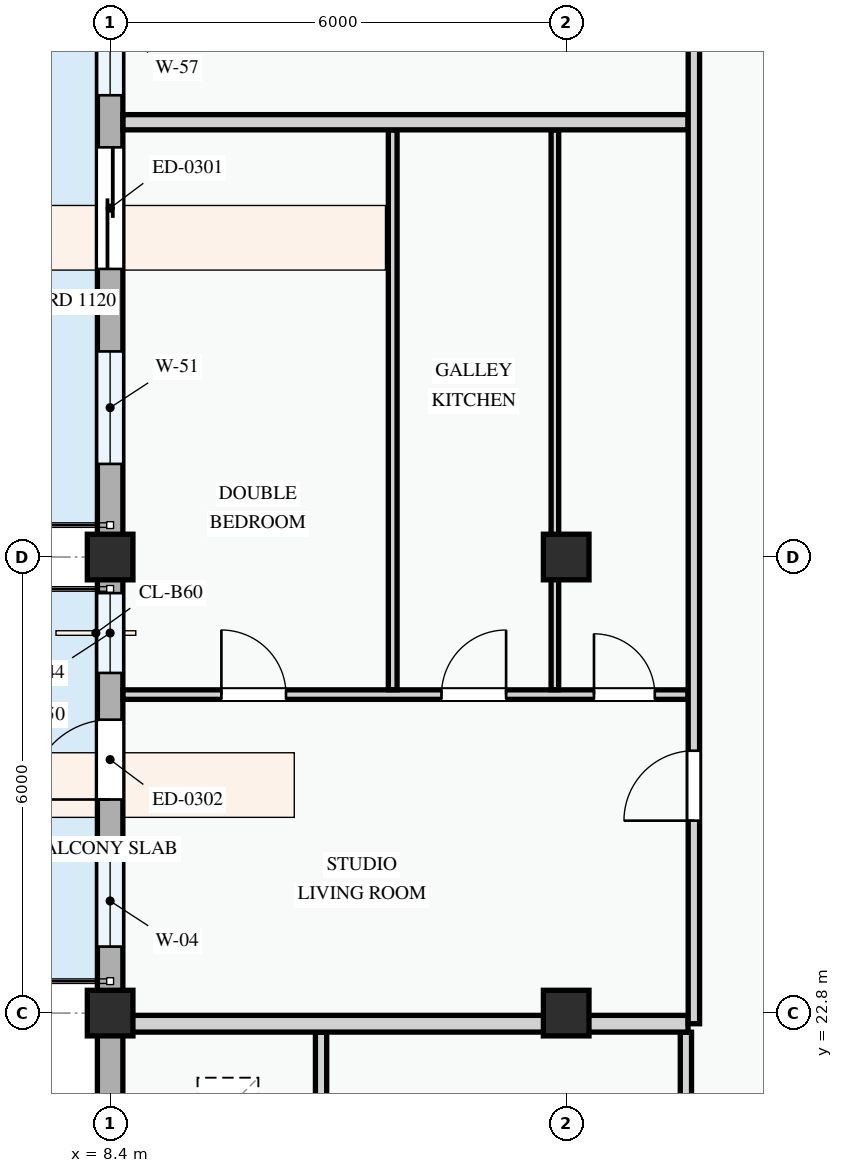
"""IFC4 building model, lengths in metres.
Left out: names, types, materials, properties, quantities, classifications, styles, units other than length and angle.
Written with IfcOpenShell. Run it as: python <this file> out.ifc"""

import sys

from ifc_helpers import new_model, si_unit, direction, frame, frame_2d, origin, origin_2d, place, context, subcontext, project, spatial, rectangle, extrude, element, fill, save


model = new_model("IFC4")
c1 = context("Model", 3, precision=1e-05, world=origin(), true_north=direction((0.0, 1.0)))
c2 = subcontext(c1, "Body", "Model", "MODEL_VIEW")
j1 = project(units=[si_unit("LENGTHUNIT", "METRE"), si_unit("PLANEANGLEUNIT", "RADIAN")], contexts=[c1])
p1 = place(None, origin())
s1 = spatial("IfcSite", under=j1, at=p1, CompositionType="ELEMENT")
p2 = place(p1, origin())
s2 = spatial("IfcBuilding", under=s1, at=p2, CompositionType="ELEMENT")
p3 = place(p2, frame((0.0, 0.0, 11.4)))
s3 = spatial("IfcBuildingStorey", under=s2, at=p3, CompositionType="ELEMENT", Elevation=11.4)
for number, where, z_axis, x_axis in (
    (1, (8.4, 22.8, 0.0), (0.0, 0.0, 1.0), (1.0, 0.0, 0.0)),
    (2, (8.4, 28.8, 0.0), (0.0, 0.0, 1.0), (1.0, 0.0, 0.0)),
    (3, (14.4, 22.8, 0.0), (0.0, 0.0, 1.0), (1.0, 0.0, 0.0)),
    (4, (14.4, 28.8, 0.0), (0.0, 0.0, 1.0), (1.0, 0.0, 0.0)),
):
    element("IfcColumn", number, at=place(p3, frame(where, z_axis=z_axis, x_axis=x_axis)), inside=s3, PredefinedType="COLUMN", context=c2, shape_type="SweptSolid", body=[
        extrude(rectangle(XDim=0.6, YDim=0.6, at=origin_2d()), origin(), (0.0, 0.0, 1.0), 3.3),
    ])
p4 = place(p3, frame((8.4, 37.2, 0.0), z_axis=(0.0, 0.0, 1.0), x_axis=(0.0, -1.0, 0.0)))
e5 = element("IfcWall", 5, at=p4, inside=s3, PredefinedType="STANDARD", context=c2, shape_type="SweptSolid", body=[
    extrude(rectangle(XDim=8.4, YDim=0.335, at=frame_2d((4.2, 0.0))), origin(), (0.0, 0.0, 1.0), 2.425),
])
p5 = place(p4, frame((3.01, 0.0, 0.0)))
e6 = element("IfcOpeningElement", 6, at=p5, cuts=e5, PredefinedType="OPENING", context=c2, shape_type="SweptSolid", body=[
    extrude(rectangle(XDim=1.6, YDim=2.2, at=frame_2d((0.8, 1.1))), frame((0.0, 0.177, 0.0), z_axis=(0.0, -1.0, 0.0), x_axis=(1.0, 0.0, 0.0)), (0.0, 0.0, 1.0), 0.355),
])
p6 = place(p4, frame((0.545, 0.0, 0.78)))
e7 = element("IfcOpeningElement", 7, at=p6, cuts=e5, PredefinedType="OPENING", context=c2, shape_type="SweptSolid", body=[
    extrude(rectangle(XDim=1.78, YDim=1.42, at=frame_2d((0.89, 0.71))), frame((0.0, 0.177, 0.0), z_axis=(0.0, -1.0, 0.0), x_axis=(1.0, 0.0, 0.0)), (0.0, 0.0, 1.0), 0.355),
])
p7 = place(p4, frame((5.695, 0.0, 0.78)))
e8 = element("IfcOpeningElement", 8, at=p7, cuts=e5, PredefinedType="OPENING", context=c2, shape_type="SweptSolid", body=[
    extrude(rectangle(XDim=1.48, YDim=1.52, at=frame_2d((0.74, 0.76))), frame((0.0, 0.177, 0.0), z_axis=(0.0, -1.0, 0.0), x_axis=(1.0, 0.0, 0.0)), (0.0, 0.0, 1.0), 0.355),
])
p8 = place(p3, frame((8.4, 28.8, 0.0), z_axis=(0.0, 0.0, 1.0), x_axis=(0.0, -1.0, 0.0)))
e9 = element("IfcWall", 9, at=p8, inside=s3, PredefinedType="STANDARD", context=c2, shape_type="SweptSolid", body=[
    extrude(rectangle(XDim=6.0, YDim=0.335, at=frame_2d((3.0, 0.0))), origin(), (0.0, 0.0, 1.0), 2.575),
])
p9 = place(p8, frame((2.14, 0.0, 0.0)))
e10 = element("IfcOpeningElement", 10, at=p9, cuts=e9, PredefinedType="OPENING", context=c2, shape_type="SweptSolid", body=[
    extrude(rectangle(XDim=1.05, YDim=2.15, at=frame_2d((0.525, 1.075))), frame((0.0, 0.177, 0.0), z_axis=(0.0, -1.0, 0.0), x_axis=(1.0, 0.0, 0.0)), (0.0, 0.0, 1.0), 0.355),
])
p10 = place(p8, frame((0.475, 0.0, 0.78)))
e11 = element("IfcOpeningElement", 11, at=p10, cuts=e9, PredefinedType="OPENING", context=c2, shape_type="SweptSolid", body=[
    extrude(rectangle(XDim=1.05, YDim=1.2, at=frame_2d((0.525, 0.6))), frame((0.0, 0.177, 0.0), z_axis=(0.0, -1.0, 0.0), x_axis=(1.0, 0.0, 0.0)), (0.0, 0.0, 1.0), 0.355),
])
p11 = place(p8, frame((3.925, 0.0, 0.78)))
e12 = element("IfcOpeningElement", 12, at=p11, cuts=e9, PredefinedType="OPENING", context=c2, shape_type="SweptSolid", body=[
    extrude(rectangle(XDim=1.2, YDim=1.35, at=frame_2d((0.6, 0.675))), frame((0.0, 0.177, 0.0), z_axis=(0.0, -1.0, 0.0), x_axis=(1.0, 0.0, 0.0)), (0.0, 0.0, 1.0), 0.355),
])
p12 = place(p3, frame((8.4, 22.8, 0.0), z_axis=(0.0, 0.0, 1.0), x_axis=(0.0, -1.0, 0.0)))
e13 = element("IfcWall", 13, at=p12, inside=s3, PredefinedType="STANDARD", context=c2, shape_type="SweptSolid", body=[
    extrude(rectangle(XDim=8.4, YDim=0.335, at=frame_2d((4.2, 0.0))), origin(), (0.0, 0.0, 1.0), 2.425),
])
p13 = place(p12, frame((1.57, 0.0, 0.78)))
e14 = element("IfcOpeningElement", 14, at=p13, cuts=e13, PredefinedType="OPENING", context=c2, shape_type="SweptSolid", body=[
    extrude(rectangle(XDim=1.25, YDim=1.3, at=frame_2d((0.625, 0.65))), frame((0.0, 0.177, 0.0), z_axis=(0.0, -1.0, 0.0), x_axis=(1.0, 0.0, 0.0)), (0.0, 0.0, 1.0), 0.355),
])
p14 = place(p12, frame((5.113, 0.0, 0.78)))
e15 = element("IfcOpeningElement", 15, at=p14, cuts=e13, PredefinedType="OPENING", context=c2, shape_type="SweptSolid", body=[
    extrude(rectangle(XDim=1.1, YDim=1.3, at=frame_2d((0.55, 0.65))), frame((0.0, 0.177, 0.0), z_axis=(0.0, -1.0, 0.0), x_axis=(1.0, 0.0, 0.0)), (0.0, 0.0, 1.0), 0.355),
])
for number, where, z_axis, x_axis in (
    (16, (11.175, 18.676, 0.0), (0.0, 0.0, 1.0), (0.0, 1.0, 0.0)),
    (17, (15.975, 18.676, 0.0), (0.0, 0.0, 1.0), (0.0, 1.0, 0.0)),
):
    element("IfcWall", number, at=place(p3, frame(where, z_axis=z_axis, x_axis=x_axis)), inside=s3, PredefinedType="PARTITIONING", context=c2, shape_type="SweptSolid", body=[
        extrude(rectangle(XDim=3.872, YDim=0.148, at=frame_2d((1.936, 0.0))), origin(), (0.0, 0.0, 1.0), 3.0),
    ])
p15 = place(p3, frame((8.57, 26.99, 0.0), z_axis=(0.0, 0.0, 1.0), x_axis=(1.0, 0.0, 0.0)))
e18 = element("IfcWall", 18, at=p15, inside=s3, PredefinedType="PARTITIONING", context=c2, shape_type="SweptSolid", body=[
    extrude(rectangle(XDim=7.433, YDim=0.125, at=frame_2d((3.717, 0.0))), origin(), (0.0, 0.0, 1.0), 3.0),
])
p16 = place(p15, frame((1.294, 0.0, 0.0)))
e19 = element("IfcOpeningElement", 19, at=p16, cuts=e18, PredefinedType="OPENING", context=c2, shape_type="SweptSolid", body=[
    extrude(rectangle(XDim=0.85, YDim=2.1, at=frame_2d((0.425, 1.05))), frame((0.0, 0.073, 0.0), z_axis=(0.0, -1.0, 0.0), x_axis=(1.0, 0.0, 0.0)), (0.0, 0.0, 1.0), 0.145),
])
p17 = place(p15, frame((4.19, 0.0, 0.0)))
e20 = element("IfcOpeningElement", 20, at=p17, cuts=e18, PredefinedType="OPENING", context=c2, shape_type="SweptSolid", body=[
    extrude(rectangle(XDim=0.85, YDim=2.1, at=frame_2d((0.425, 1.05))), frame((0.0, 0.073, 0.0), z_axis=(0.0, -1.0, 0.0), x_axis=(1.0, 0.0, 0.0)), (0.0, 0.0, 1.0), 0.145),
])
p18 = place(p15, frame((6.196, 0.0, 0.0)))
e21 = element("IfcOpeningElement", 21, at=p18, cuts=e18, PredefinedType="OPENING", context=c2, shape_type="SweptSolid", body=[
    extrude(rectangle(XDim=0.8, YDim=2.1, at=frame_2d((0.4, 1.05))), frame((0.0, 0.073, 0.0), z_axis=(0.0, -1.0, 0.0), x_axis=(1.0, 0.0, 0.0)), (0.0, 0.0, 1.0), 0.145),
])
p19 = place(p3, frame((12.118, 27.054, 0.0), z_axis=(0.0, 0.0, 1.0), x_axis=(0.0, 1.0, 0.0)))
e22 = element("IfcWall", 22, at=p19, inside=s3, PredefinedType="PARTITIONING", context=c2, shape_type="SweptSolid", body=[
    extrude(rectangle(XDim=7.364, YDim=0.115, at=frame_2d((3.682, 0.0))), origin(), (0.0, 0.0, 1.0), 3.0),
])
p20 = place(p3, frame((14.251, 27.054, 0.0), z_axis=(0.0, 0.0, 1.0), x_axis=(0.0, 1.0, 0.0)))
e23 = element("IfcWall", 23, at=p20, inside=s3, PredefinedType="PARTITIONING", context=c2, shape_type="SweptSolid", body=[
    extrude(rectangle(XDim=7.364, YDim=0.1, at=frame_2d((3.682, 0.0))), origin(), (0.0, 0.0, 1.0), 2.425),
])
p21 = place(p3, frame((8.57, 22.66, 0.0), z_axis=(0.0, 0.0, 1.0), x_axis=(1.0, 0.0, 0.0)))
e24 = element("IfcWall", 24, at=p21, inside=s3, PredefinedType="PARTITIONING", context=c2, shape_type="SweptSolid", body=[
    extrude(rectangle(XDim=7.433, YDim=0.22, at=frame_2d((3.717, 0.0))), origin(), (0.0, 0.0, 1.0), 2.375),
])
p22 = place(p3, frame((8.57, 34.52, 0.0), z_axis=(0.0, 0.0, 1.0), x_axis=(1.0, 0.0, 0.0)))
e25 = element("IfcWall", 25, at=p22, inside=s3, PredefinedType="PARTITIONING", context=c2, shape_type="SweptSolid", body=[
    extrude(rectangle(XDim=7.433, YDim=0.2, at=frame_2d((3.717, 0.0))), origin(), (0.0, 0.0, 1.0), 3.0),
])
p23 = place(p3, frame((16.08, 22.66, 0.0), z_axis=(0.0, 0.0, 1.0), x_axis=(0.0, 1.0, 0.0)))
e26 = element("IfcWall", 26, at=p23, inside=s3, PredefinedType="PARTITIONING", context=c2, shape_type="SweptSolid", body=[
    extrude(rectangle(XDim=34.771, YDim=0.15, at=frame_2d((17.385, 0.0))), origin(), (0.0, 0.0, 1.0), 3.0),
])
p24 = place(p23, frame((2.672, 0.0, 0.0)))
e27 = element("IfcOpeningElement", 27, at=p24, cuts=e26, PredefinedType="OPENING", context=c2, shape_type="SweptSolid", body=[
    extrude(rectangle(XDim=0.92, YDim=2.1, at=frame_2d((0.46, 1.05))), frame((0.0, 0.085, 0.0), z_axis=(0.0, -1.0, 0.0), x_axis=(1.0, 0.0, 0.0)), (0.0, 0.0, 1.0), 0.17),
])
p25 = place(p23, frame((16.58, 0.0, 0.0)))
e28 = element("IfcOpeningElement", 28, at=p25, cuts=e26, PredefinedType="OPENING", context=c2, shape_type="SweptSolid", body=[
    extrude(rectangle(XDim=0.92, YDim=2.1, at=frame_2d((0.46, 1.05))), frame((0.0, 0.085, 0.0), z_axis=(0.0, -1.0, 0.0), x_axis=(1.0, 0.0, 0.0)), (0.0, 0.0, 1.0), 0.17),
])
p26 = place(p23, frame((24.315, 0.0, 0.0)))
e29 = element("IfcOpeningElement", 29, at=p26, cuts=e26, PredefinedType="OPENING", context=c2, shape_type="SweptSolid", body=[
    extrude(rectangle(XDim=0.96, YDim=2.12, at=frame_2d((0.48, 1.06))), frame((0.0, 0.085, 0.0), z_axis=(0.0, -1.0, 0.0), x_axis=(1.0, 0.0, 0.0)), (0.0, 0.0, 1.0), 0.17),
])
p27 = place(p5, frame((1.6, 0.0, 0.0), z_axis=(0.0, 0.0, 1.0), x_axis=(-1.0, 0.0, 0.0)))
e30 = element("IfcDoor", 30, at=p27, inside=s3, OperationType="SLIDING_TO_LEFT", PredefinedType="DOOR", context=c2, shape_type="SweptSolid", body=[
    extrude(rectangle(XDim=1.6, YDim=2.2, at=frame_2d((0.8, 1.1))), frame((0.0, 0.025, 0.0), z_axis=(0.0, -1.0, 0.0), x_axis=(1.0, 0.0, 0.0)), (0.0, 0.0, 1.0), 0.05),
])
fill(e6, e30)
p28 = place(p6, origin())
e31 = element("IfcWindow", 31, at=p28, inside=s3, PartitioningType="DOUBLE_PANEL_VERTICAL", PredefinedType="WINDOW", context=c2, shape_type="SweptSolid", body=[
    extrude(rectangle(XDim=1.78, YDim=1.42, at=frame_2d((0.89, 0.71))), frame((0.0, 0.03, 0.0), z_axis=(0.0, -1.0, 0.0), x_axis=(1.0, 0.0, 0.0)), (0.0, 0.0, 1.0), 0.06),
])
fill(e7, e31)
p29 = place(p7, origin())
e32 = element("IfcWindow", 32, at=p29, inside=s3, PartitioningType="SINGLE_PANEL", PredefinedType="WINDOW", context=c2, shape_type="SweptSolid", body=[
    extrude(rectangle(XDim=1.48, YDim=1.52, at=frame_2d((0.74, 0.76))), frame((0.0, 0.03, 0.0), z_axis=(0.0, -1.0, 0.0), x_axis=(1.0, 0.0, 0.0)), (0.0, 0.0, 1.0), 0.06),
])
fill(e8, e32)
p30 = place(p9, frame((1.05, 0.0, 0.0), z_axis=(0.0, 0.0, 1.0), x_axis=(-1.0, 0.0, 0.0)))
e33 = element("IfcDoor", 33, at=p30, inside=s3, OperationType="SINGLE_SWING_LEFT", PredefinedType="DOOR", context=c2, shape_type="SweptSolid", body=[
    extrude(rectangle(XDim=1.05, YDim=2.15, at=frame_2d((0.525, 1.075))), frame((0.0, 0.025, 0.0), z_axis=(0.0, -1.0, 0.0), x_axis=(1.0, 0.0, 0.0)), (0.0, 0.0, 1.0), 0.05),
])
fill(e10, e33)
p31 = place(p10, origin())
e34 = element("IfcWindow", 34, at=p31, inside=s3, PartitioningType="SINGLE_PANEL", PredefinedType="WINDOW", context=c2, shape_type="SweptSolid", body=[
    extrude(rectangle(XDim=1.05, YDim=1.2, at=frame_2d((0.525, 0.6))), frame((0.0, 0.03, 0.0), z_axis=(0.0, -1.0, 0.0), x_axis=(1.0, 0.0, 0.0)), (0.0, 0.0, 1.0), 0.06),
])
fill(e11, e34)
p32 = place(p11, origin())
e35 = element("IfcWindow", 35, at=p32, inside=s3, PartitioningType="SINGLE_PANEL", PredefinedType="WINDOW", context=c2, shape_type="SweptSolid", body=[
    extrude(rectangle(XDim=1.2, YDim=1.35, at=frame_2d((0.6, 0.675))), frame((0.0, 0.03, 0.0), z_axis=(0.0, -1.0, 0.0), x_axis=(1.0, 0.0, 0.0)), (0.0, 0.0, 1.0), 0.06),
])
fill(e12, e35)
p33 = place(p16, origin())
e36 = element("IfcDoor", 36, at=p33, inside=s3, OperationType="SINGLE_SWING_LEFT", PredefinedType="DOOR", context=c2, shape_type="SweptSolid", body=[
    extrude(rectangle(XDim=0.85, YDim=2.1, at=frame_2d((0.425, 1.05))), frame((0.0, 0.025, 0.0), z_axis=(0.0, -1.0, 0.0), x_axis=(1.0, 0.0, 0.0)), (0.0, 0.0, 1.0), 0.05),
])
fill(e19, e36)
p34 = place(p17, origin())
e37 = element("IfcDoor", 37, at=p34, inside=s3, OperationType="SINGLE_SWING_RIGHT", PredefinedType="DOOR", context=c2, shape_type="SweptSolid", body=[
    extrude(rectangle(XDim=0.85, YDim=2.1, at=frame_2d((0.425, 1.05))), frame((0.0, 0.025, 0.0), z_axis=(0.0, -1.0, 0.0), x_axis=(1.0, 0.0, 0.0)), (0.0, 0.0, 1.0), 0.05),
])
fill(e20, e37)
p35 = place(p18, origin())
e38 = element("IfcDoor", 38, at=p35, inside=s3, OperationType="SINGLE_SWING_LEFT", PredefinedType="DOOR", context=c2, shape_type="SweptSolid", body=[
    extrude(rectangle(XDim=0.8, YDim=2.1, at=frame_2d((0.4, 1.05))), frame((0.0, 0.025, 0.0), z_axis=(0.0, -1.0, 0.0), x_axis=(1.0, 0.0, 0.0)), (0.0, 0.0, 1.0), 0.05),
])
fill(e21, e38)
p36 = place(p24, origin())
e39 = element("IfcDoor", 39, at=p36, inside=s3, OperationType="SINGLE_SWING_LEFT", PredefinedType="DOOR", context=c2, shape_type="SweptSolid", body=[
    extrude(rectangle(XDim=0.92, YDim=2.1, at=frame_2d((0.46, 1.05))), frame((0.0, 0.025, 0.0), z_axis=(0.0, -1.0, 0.0), x_axis=(1.0, 0.0, 0.0)), (0.0, 0.0, 1.0), 0.05),
])
fill(e27, e39)
save(model, sys.argv[1])
